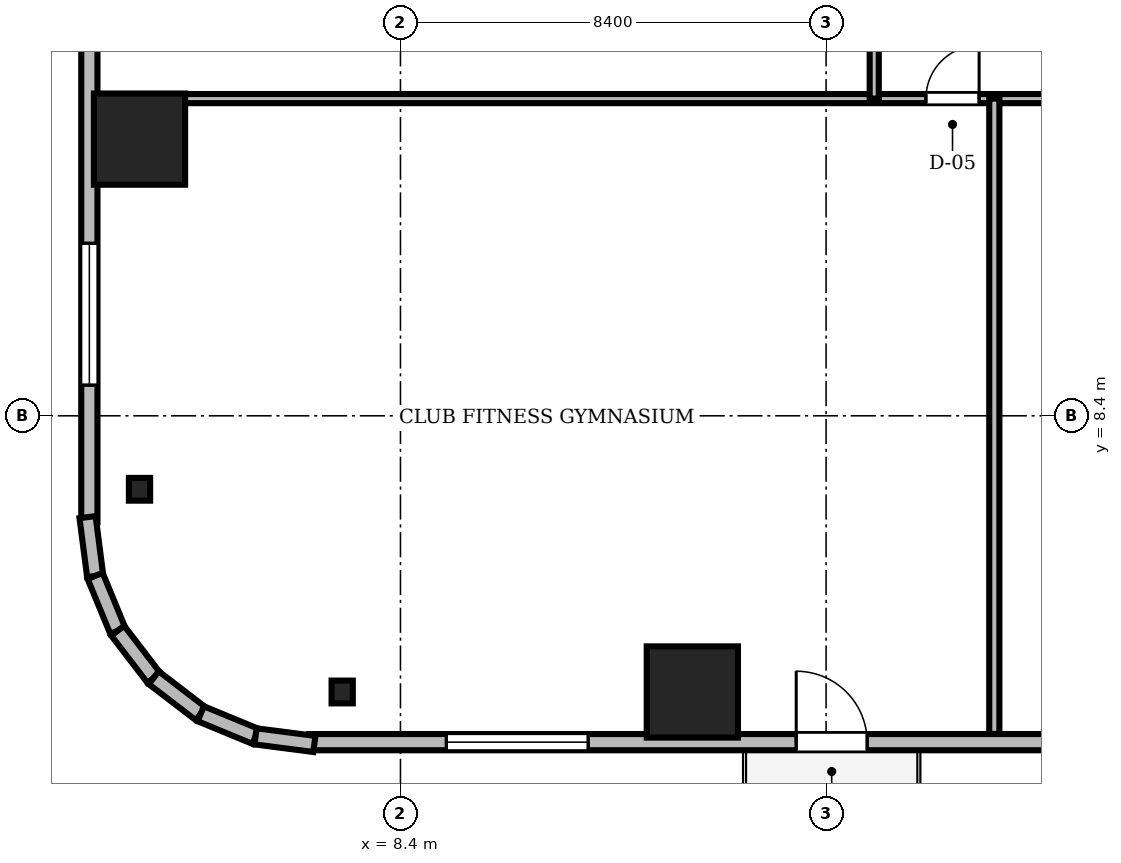
"""IFC4 building model, lengths in metres.
Left out: names, types, materials, properties, quantities, classifications, styles, units other than length and angle.
Written with IfcOpenShell. Run it as: python <this file> out.ifc"""

import sys

from ifc_helpers import new_model, si_unit, direction, frame, frame_2d, origin, origin_2d, place, context, subcontext, project, spatial, rectangle, i_section, extrude, source, transform, mapped, element, fill, save


model = new_model("IFC4")
c1 = context("Model", 3, precision=1e-05, world=origin(), true_north=direction((0.0, 1.0)))
c2 = subcontext(c1, "Body", "Model", "MODEL_VIEW")
j1 = project(units=[si_unit("LENGTHUNIT", "METRE"), si_unit("PLANEANGLEUNIT", "RADIAN")], contexts=[c1])
p1 = place(None, origin())
s1 = spatial("IfcSite", under=j1, at=p1, CompositionType="ELEMENT")
p2 = place(p1, origin())
s2 = spatial("IfcBuilding", under=s1, at=p2, CompositionType="ELEMENT")
p3 = place(p2, frame((0.0, 0.0, 34.9)))
s3 = spatial("IfcBuildingStorey", under=s2, at=p3, CompositionType="ELEMENT", Elevation=34.9)
m1 = source(origin(), c2, "Body", "SweptSolid", [
    extrude(rectangle(XDim=1.8, YDim=1.8, at=origin_2d()), origin(), (0.0, 0.0, 1.0), 3.41),
])
for number, where, z_axis, x_axis in (
    (1, (14.16, 2.95, 0.0), (0.0, 0.0, 1.0), (1.0, 0.0, 0.0)),
    (2, (3.25, 13.86, 0.0), (0.0, 0.0, 1.0), (1.0, 0.0, 0.0)),
):
    element("IfcColumn", number, at=place(p3, frame(where, z_axis=z_axis, x_axis=x_axis)), inside=s3, PredefinedType="COLUMN", context=c2, shape_type="MappedRepresentation", body=[
        mapped(m1, transform((0.0, 0.0, 0.0), scale=1.0)),
    ])
m2 = source(origin(), c2, "Body", "SweptSolid", [
    extrude(i_section(OverallWidth=0.419, OverallDepth=0.449, WebThickness=0.031, FlangeThickness=0.048, FilletRadius=0.015, at=origin_2d()), origin(), (0.0, 0.0, 1.0), 3.41),
])
for number, where, z_axis, x_axis in (
    (3, (7.25, 2.95, 0.0), (0.0, 0.0, 1.0), (1.0, 0.0, 0.0)),
    (4, (3.25, 6.95, 0.0), (0.0, 0.0, 1.0), (1.0, 0.0, 0.0)),
):
    element("IfcColumn", number, at=place(p3, frame(where, z_axis=z_axis, x_axis=x_axis)), inside=s3, PredefinedType="COLUMN", context=c2, shape_type="MappedRepresentation", body=[
        mapped(m2, transform((0.0, 0.0, 0.0), scale=1.0)),
    ])
m3 = source(origin(), c2, "Body", "SweptSolid", [
    extrude(rectangle(XDim=15.6, YDim=0.32, at=frame_2d((7.8, 0.0))), origin(), (0.0, 0.0, 1.0), 3.41),
])
p4 = place(p3, frame((6.6, 1.96, 0.0), z_axis=(0.0, 0.0, 1.0), x_axis=(1.0, 0.0, 0.0)))
e5 = element("IfcWall", 5, at=p4, inside=s3, PredefinedType="SOLIDWALL", context=c2, shape_type="MappedRepresentation", body=[
    mapped(m3, transform((0.0, 0.0, 0.0), scale=1.0)),
])
m4 = source(origin(), c2, "Body", "SweptSolid", [
    extrude(rectangle(XDim=1.4, YDim=2.3, at=frame_2d((0.7, 1.15))), frame((0.0, 0.17, 0.0), z_axis=(0.0, -1.0, 0.0), x_axis=(1.0, 0.0, 0.0)), (0.0, 0.0, 1.0), 0.34),
])
p5 = place(p4, frame((9.61, 0.0, 0.0)))
e6 = element("IfcOpeningElement", 6, at=p5, cuts=e5, PredefinedType="OPENING", context=c2, shape_type="MappedRepresentation", body=[
    mapped(m4, transform((0.0, 0.0, 0.0), scale=1.0)),
])
m5 = source(origin(), c2, "Body", "SweptSolid", [
    extrude(rectangle(XDim=2.8, YDim=2.4, at=frame_2d((1.4, 1.2))), frame((0.0, 0.17, 0.0), z_axis=(0.0, -1.0, 0.0), x_axis=(1.0, 0.0, 0.0)), (0.0, 0.0, 1.0), 0.34),
])
p6 = place(p4, frame((2.705, 0.0, 0.72)))
e7 = element("IfcOpeningElement", 7, at=p6, cuts=e5, PredefinedType="OPENING", context=c2, shape_type="MappedRepresentation", body=[
    mapped(m5, transform((0.0, 0.0, 0.0), scale=1.0)),
])
p7 = place(p3, frame((2.26, 21.9, 0.0), z_axis=(0.0, 0.0, 1.0), x_axis=(0.0, -1.0, 0.0)))
e8 = element("IfcWall", 8, at=p7, inside=s3, PredefinedType="SOLIDWALL", context=c2, shape_type="MappedRepresentation", body=[
    mapped(m3, transform((0.0, 0.0, 0.0), scale=1.0)),
])
p8 = place(p7, frame((10.095, 0.0, 0.72)))
e9 = element("IfcOpeningElement", 9, at=p8, cuts=e8, PredefinedType="OPENING", context=c2, shape_type="MappedRepresentation", body=[
    mapped(m5, transform((0.0, 0.0, 0.0), scale=1.0)),
])
m6 = source(origin(), c2, "Body", "SweptSolid", [
    extrude(rectangle(XDim=1.171, YDim=0.32, at=frame_2d((0.585, 0.0))), origin(), (0.0, 0.0, 1.0), 3.41),
])
p9 = place(p3, frame((2.224, 6.401, 0.0), z_axis=(0.0, 0.0, 1.0), x_axis=(0.128269133229, -0.991739395941, 0.0)))
e10 = element("IfcWall", 10, at=p9, inside=s3, PredefinedType="SOLIDWALL", context=c2, shape_type="MappedRepresentation", body=[
    mapped(m6, transform((0.0, 0.0, 0.0), scale=1.0)),
])
m7 = source(origin(), c2, "Body", "SweptSolid", [
    extrude(rectangle(XDim=1.169, YDim=0.32, at=frame_2d((0.584, 0.0))), origin(), (0.0, 0.0, 1.0), 3.41),
])
for number, where, z_axis, x_axis in (
    (11, (2.375, 5.24, 0.0), (0.0, 0.0, 1.0), (0.381, -0.925, 0.0)),
    (12, (2.82, 4.159, 0.0), (0.0, 0.0, 1.0), (0.608, -0.794, 0.0)),
):
    element("IfcWall", number, at=place(p3, frame(where, z_axis=z_axis, x_axis=x_axis)), inside=s3, PredefinedType="SOLIDWALL", context=c2, shape_type="MappedRepresentation", body=[
        mapped(m7, transform((0.0, 0.0, 0.0), scale=1.0)),
    ])
m8 = source(origin(), c2, "Body", "SweptSolid", [
    extrude(rectangle(XDim=1.169, YDim=0.32, at=frame_2d((0.584, 0.0))), origin(), (0.0, 0.0, 1.0), 3.41),
])
p10 = place(p3, frame((3.531, 3.231, 0.0), z_axis=(0.0, 0.0, 1.0), x_axis=(0.793663520347, -0.608356981114, 0.0)))
e13 = element("IfcWall", 13, at=p10, inside=s3, PredefinedType="SOLIDWALL", context=c2, shape_type="MappedRepresentation", body=[
    mapped(m8, transform((0.0, 0.0, 0.0), scale=1.0)),
])
m9 = source(origin(), c2, "Body", "SweptSolid", [
    extrude(rectangle(XDim=1.169, YDim=0.32, at=frame_2d((0.585, 0.0))), origin(), (0.0, 0.0, 1.0), 3.41),
])
p11 = place(p3, frame((4.459, 2.52, 0.0), z_axis=(0.0, 0.0, 1.0), x_axis=(0.924479075121, -0.381232789334, 0.0)))
e14 = element("IfcWall", 14, at=p11, inside=s3, PredefinedType="SOLIDWALL", context=c2, shape_type="MappedRepresentation", body=[
    mapped(m9, transform((0.0, 0.0, 0.0), scale=1.0)),
])
m10 = source(origin(), c2, "Body", "SweptSolid", [
    extrude(rectangle(XDim=1.17, YDim=0.32, at=frame_2d((0.585, 0.0))), origin(), (0.0, 0.0, 1.0), 3.41),
])
p12 = place(p3, frame((5.54, 2.074, 0.0), z_axis=(0.0, 0.0, 1.0), x_axis=(0.991762485493, -0.128090485085, 0.0)))
e15 = element("IfcWall", 15, at=p12, inside=s3, PredefinedType="SOLIDWALL", context=c2, shape_type="MappedRepresentation", body=[
    mapped(m10, transform((0.0, 0.0, 0.0), scale=1.0)),
])
m11 = source(origin(), c2, "Body", "SweptSolid", [
    extrude(rectangle(XDim=46.156, YDim=0.18, at=frame_2d((23.078, 0.0))), origin(), (0.0, 0.0, 1.0), 2.652),
])
p13 = place(p3, frame((2.422, 14.66, 0.0), z_axis=(0.0, 0.0, 1.0), x_axis=(1.0, 0.0, 0.0)))
e16 = element("IfcWall", 16, at=p13, inside=s3, PredefinedType="PARTITIONING", context=c2, shape_type="MappedRepresentation", body=[
    mapped(m11, transform((0.0, 0.0, 0.0), scale=1.0)),
])
m12 = source(origin(), c2, "Body", "SweptSolid", [
    extrude(rectangle(XDim=1.05, YDim=2.2, at=frame_2d((0.525, 1.1))), frame((0.0, 0.1, 0.0), z_axis=(0.0, -1.0, 0.0), x_axis=(1.0, 0.0, 0.0)), (0.0, 0.0, 1.0), 0.2),
])
p14 = place(p13, frame((16.348, 0.0, 0.0)))
e17 = element("IfcOpeningElement", 17, at=p14, cuts=e16, PredefinedType="OPENING", context=c2, shape_type="MappedRepresentation", body=[
    mapped(m12, transform((0.0, 0.0, 0.0), scale=1.0)),
])
p15 = place(p13, frame((20.38, 0.0, 0.0)))
e18 = element("IfcOpeningElement", 18, at=p15, cuts=e16, PredefinedType="OPENING", context=c2, shape_type="MappedRepresentation", body=[
    mapped(m12, transform((0.0, 0.0, 0.0), scale=1.0)),
])
p16 = place(p13, frame((26.783, 0.0, 0.0)))
e19 = element("IfcOpeningElement", 19, at=p16, cuts=e16, PredefinedType="OPENING", context=c2, shape_type="MappedRepresentation", body=[
    mapped(m12, transform((0.0, 0.0, 0.0), scale=1.0)),
])
p17 = place(p13, frame((33.186, 0.0, 0.0)))
e20 = element("IfcOpeningElement", 20, at=p17, cuts=e16, PredefinedType="OPENING", context=c2, shape_type="MappedRepresentation", body=[
    mapped(m12, transform((0.0, 0.0, 0.0), scale=1.0)),
])
p18 = place(p13, frame((40.998, 0.0, 0.0)))
e21 = element("IfcOpeningElement", 21, at=p18, cuts=e16, PredefinedType="OPENING", context=c2, shape_type="MappedRepresentation", body=[
    mapped(m12, transform((0.0, 0.0, 0.0), scale=1.0)),
])
m13 = source(origin(), c2, "Body", "SweptSolid", [
    extrude(rectangle(XDim=13.89, YDim=0.18, at=frame_2d((6.945, 0.0))), origin(), (0.0, 0.0, 1.0), 2.802),
])
p19 = place(p3, frame((17.75, 14.66, 0.0), z_axis=(0.0, 0.0, 1.0), x_axis=(0.0, 1.0, 0.0)))
e22 = element("IfcWall", 22, at=p19, inside=s3, PredefinedType="PARTITIONING", context=c2, shape_type="MappedRepresentation", body=[
    mapped(m13, transform((0.0, 0.0, 0.0), scale=1.0)),
])
p20 = place(p19, frame((1.77, 0.0, 0.0)))
e23 = element("IfcOpeningElement", 23, at=p20, cuts=e22, PredefinedType="OPENING", context=c2, shape_type="MappedRepresentation", body=[
    mapped(m12, transform((0.0, 0.0, 0.0), scale=1.0)),
])
m14 = source(origin(), c2, "Body", "SweptSolid", [
    extrude(rectangle(XDim=0.95, YDim=2.15, at=frame_2d((0.475, 1.075))), frame((0.0, 0.1, 0.0), z_axis=(0.0, -1.0, 0.0), x_axis=(1.0, 0.0, 0.0)), (0.0, 0.0, 1.0), 0.2),
])
p21 = place(p19, frame((7.575, 0.0, 0.0)))
e24 = element("IfcOpeningElement", 24, at=p21, cuts=e22, PredefinedType="OPENING", context=c2, shape_type="MappedRepresentation", body=[
    mapped(m14, transform((0.0, 0.0, 0.0), scale=1.0)),
])
p22 = place(p19, frame((10.93, 0.0, 0.0)))
e25 = element("IfcOpeningElement", 25, at=p22, cuts=e22, PredefinedType="OPENING", context=c2, shape_type="MappedRepresentation", body=[
    mapped(m12, transform((0.0, 0.0, 0.0), scale=1.0)),
])
m15 = source(origin(), c2, "Body", "SweptSolid", [
    extrude(rectangle(XDim=12.538, YDim=0.2, at=frame_2d((6.269, 0.0))), origin(), (0.0, 0.0, 1.0), 2.652),
])
p23 = place(p3, frame((20.12, 2.122, 0.0), z_axis=(0.0, 0.0, 1.0), x_axis=(0.0, 1.0, 0.0)))
e26 = element("IfcWall", 26, at=p23, inside=s3, PredefinedType="PARTITIONING", context=c2, shape_type="MappedRepresentation", body=[
    mapped(m15, transform((0.0, 0.0, 0.0), scale=1.0)),
])
m16 = source(origin(), c2, "Body", "SweptSolid", [
    extrude(rectangle(XDim=1.4, YDim=2.3, at=frame_2d((0.7, 1.15))), frame((0.0, 0.025, 0.0), z_axis=(0.0, -1.0, 0.0), x_axis=(1.0, 0.0, 0.0)), (0.0, 0.0, 1.0), 0.05),
])
p24 = place(p5, frame((1.4, 0.0, 0.0), z_axis=(0.0, 0.0, 1.0), x_axis=(-1.0, 0.0, 0.0)))
e27 = element("IfcDoor", 27, at=p24, inside=s3, OperationType="DOUBLE_DOOR_SLIDING", PredefinedType="DOOR", context=c2, shape_type="MappedRepresentation", body=[
    mapped(m16, transform((0.0, 0.0, 0.0), scale=1.0)),
])
fill(e6, e27)
m17 = source(origin(), c2, "Body", "SweptSolid", [
    extrude(rectangle(XDim=2.8, YDim=2.4, at=frame_2d((1.4, 1.2))), frame((0.0, 0.03, 0.0), z_axis=(0.0, -1.0, 0.0), x_axis=(1.0, 0.0, 0.0)), (0.0, 0.0, 1.0), 0.06),
])
p25 = place(p6, origin())
e28 = element("IfcWindow", 28, at=p25, inside=s3, PartitioningType="SINGLE_PANEL", PredefinedType="WINDOW", context=c2, shape_type="MappedRepresentation", body=[
    mapped(m17, transform((0.0, 0.0, 0.0), scale=1.0)),
])
fill(e7, e28)
p26 = place(p8, origin())
e29 = element("IfcWindow", 29, at=p26, inside=s3, PartitioningType="SINGLE_PANEL", PredefinedType="WINDOW", context=c2, shape_type="MappedRepresentation", body=[
    mapped(m17, transform((0.0, 0.0, 0.0), scale=1.0)),
])
fill(e9, e29)
m18 = source(origin(), c2, "Body", "SweptSolid", [
    extrude(rectangle(XDim=1.05, YDim=2.2, at=frame_2d((0.525, 1.1))), frame((0.0, 0.025, 0.0), z_axis=(0.0, -1.0, 0.0), x_axis=(1.0, 0.0, 0.0)), (0.0, 0.0, 1.0), 0.05),
])
p27 = place(p14, origin())
e30 = element("IfcDoor", 30, at=p27, inside=s3, OperationType="SINGLE_SWING_RIGHT", PredefinedType="DOOR", context=c2, shape_type="MappedRepresentation", body=[
    mapped(m18, transform((0.0, 0.0, 0.0), scale=1.0)),
])
fill(e17, e30)
save(model, sys.argv[1])
